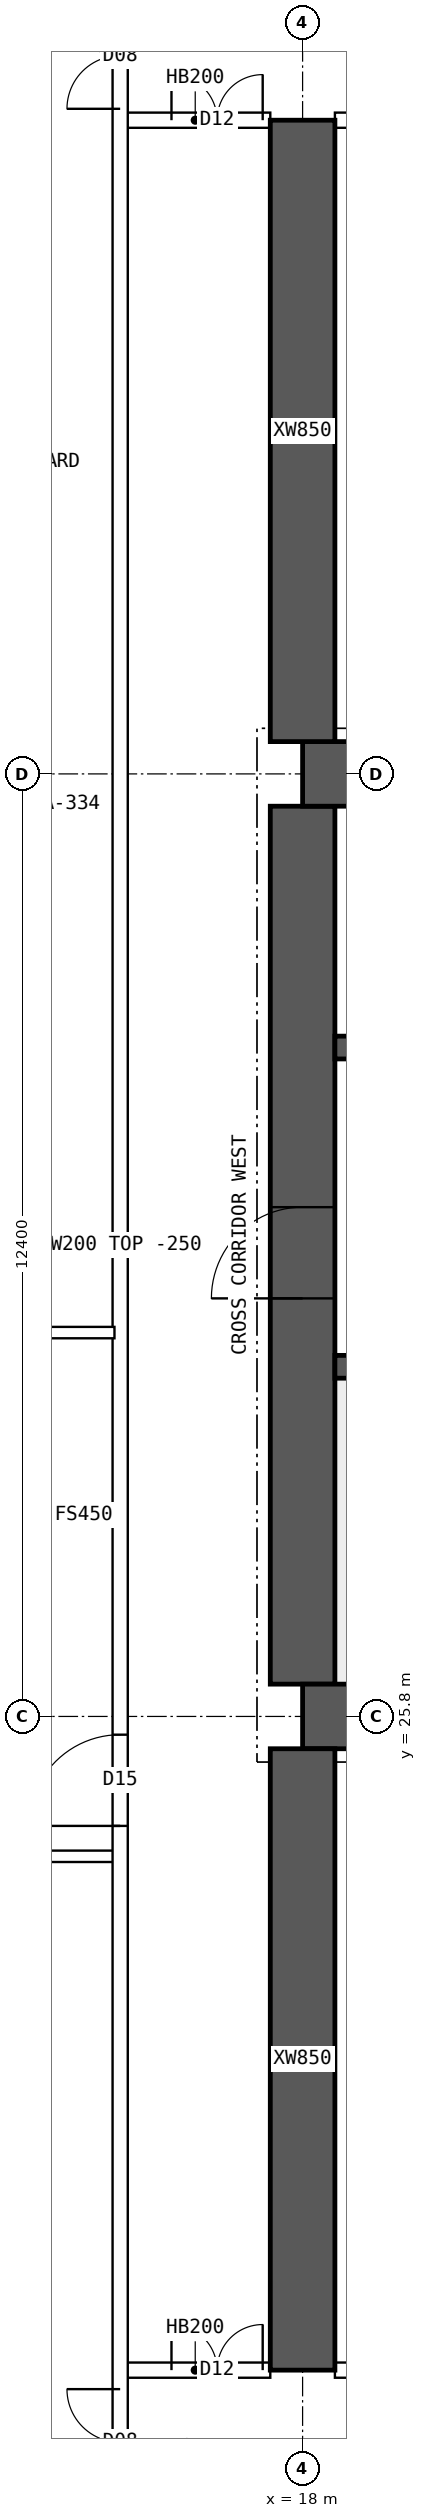
"""IFC4 building model, lengths in metres.
Left out: names, types, materials, properties, quantities, classifications, styles, units other than length and angle.
Written with IfcOpenShell. Run it as: python <this file> out.ifc"""

import sys

from ifc_helpers import new_model, si_unit, direction, frame, frame_2d, origin, place, context, subcontext, project, spatial, polyline, rectangle, outline, extrude, element, fill, save


model = new_model("IFC4")
c1 = context("Model", 3, precision=1e-05, world=origin(), true_north=direction((0.0, 1.0)))
c2 = subcontext(c1, "Body", "Model", "MODEL_VIEW")
j1 = project(units=[si_unit("LENGTHUNIT", "METRE"), si_unit("PLANEANGLEUNIT", "RADIAN")], contexts=[c1])
p1 = place(None, origin())
s1 = spatial("IfcSite", under=j1, at=p1, CompositionType="ELEMENT")
p2 = place(p1, origin())
s2 = spatial("IfcBuilding", under=s1, at=p2, CompositionType="ELEMENT")
p3 = place(p2, frame((0.0, 0.0, 163.6)))
s3 = spatial("IfcBuildingStorey", under=s2, at=p3, CompositionType="ELEMENT", Elevation=163.6)
for number, where, z_axis, x_axis in (
    (1, (18.0, 25.8, 0.0), (0.0, 0.0, 1.0), (1.0, 0.0, 0.0)),
    (2, (18.0, 38.2, 0.0), (0.0, 0.0, 1.0), (1.0, 0.0, 0.0)),
):
    element("IfcWall", number, at=place(p3, frame(where, z_axis=z_axis, x_axis=x_axis)), inside=s3, PredefinedType="SHEAR", context=c2, shape_type="SweptSolid", body=[
        extrude(rectangle(XDim=48.0, YDim=0.85, at=frame_2d((24.0, 0.0))), origin(), (0.0, 0.0, 1.0), 3.75),
    ])
p4 = place(p3, frame((18.0, 26.225, 0.0), z_axis=(0.0, 0.0, 1.0), x_axis=(0.0, 1.0, 0.0)))
e3 = element("IfcWall", 3, at=p4, inside=s3, PredefinedType="SHEAR", context=c2, shape_type="SweptSolid", body=[
    extrude(rectangle(XDim=11.55, YDim=0.85, at=frame_2d((5.775, 0.0))), origin(), (0.0, 0.0, 1.0), 3.75),
])
p5 = place(p4, frame((5.075, 0.0, 0.0)))
e4 = element("IfcOpeningElement", 4, at=p5, cuts=e3, PredefinedType="OPENING", context=c2, shape_type="SweptSolid", body=[
    extrude(rectangle(XDim=1.2, YDim=2.1, at=frame_2d((0.6, 1.05))), frame((0.0, 0.435, 0.0), z_axis=(0.0, -1.0, 0.0), x_axis=(1.0, 0.0, 0.0)), (0.0, 0.0, 1.0), 0.87),
])
p6 = place(p3, frame((18.425, 30.4, 0.0), z_axis=(0.0, 0.0, 1.0), x_axis=(1.0, 0.0, 0.0)))
e5 = element("IfcWall", 5, at=p6, inside=s3, PredefinedType="SHEAR", context=c2, shape_type="SweptSolid", body=[
    extrude(rectangle(XDim=47.15, YDim=0.3, at=frame_2d((23.575, 0.0))), origin(), (0.0, 0.0, 1.0), 3.75),
])
p7 = place(p6, frame((0.4, 0.0, 0.0)))
e6 = element("IfcOpeningElement", 6, at=p7, cuts=e5, PredefinedType="OPENING", context=c2, shape_type="SweptSolid", body=[
    extrude(rectangle(XDim=1.0, YDim=2.1, at=frame_2d((0.5, 1.05))), frame((0.0, 0.16, 0.0), z_axis=(0.0, -1.0, 0.0), x_axis=(1.0, 0.0, 0.0)), (0.0, 0.0, 1.0), 0.32),
])
p8 = place(p6, frame((45.75, 0.0, 0.0)))
e7 = element("IfcOpeningElement", 7, at=p8, cuts=e5, PredefinedType="OPENING", context=c2, shape_type="SweptSolid", body=[
    extrude(rectangle(XDim=1.0, YDim=2.1, at=frame_2d((0.5, 1.05))), frame((0.0, 0.16, 0.0), z_axis=(0.0, -1.0, 0.0), x_axis=(1.0, 0.0, 0.0)), (0.0, 0.0, 1.0), 0.32),
])
p9 = place(p6, frame((8.325, 0.0, 0.0)))
e8 = element("IfcOpeningElement", 8, at=p9, cuts=e5, PredefinedType="OPENING", context=c2, shape_type="SweptSolid", body=[
    extrude(rectangle(XDim=1.1, YDim=2.1, at=frame_2d((0.55, 1.05))), frame((0.0, 0.16, 0.0), z_axis=(0.0, -1.0, 0.0), x_axis=(1.0, 0.0, 0.0)), (0.0, 0.0, 1.0), 0.32),
])
p10 = place(p6, frame((10.925, 0.0, 0.0)))
e9 = element("IfcOpeningElement", 9, at=p10, cuts=e5, PredefinedType="OPENING", context=c2, shape_type="SweptSolid", body=[
    extrude(rectangle(XDim=1.1, YDim=2.1, at=frame_2d((0.55, 1.05))), frame((0.0, 0.16, 0.0), z_axis=(0.0, -1.0, 0.0), x_axis=(1.0, 0.0, 0.0)), (0.0, 0.0, 1.0), 0.32),
])
p11 = place(p6, frame((13.525, 0.0, 0.0)))
e10 = element("IfcOpeningElement", 10, at=p11, cuts=e5, PredefinedType="OPENING", context=c2, shape_type="SweptSolid", body=[
    extrude(rectangle(XDim=1.1, YDim=2.1, at=frame_2d((0.55, 1.05))), frame((0.0, 0.16, 0.0), z_axis=(0.0, -1.0, 0.0), x_axis=(1.0, 0.0, 0.0)), (0.0, 0.0, 1.0), 0.32),
])
p12 = place(p6, frame((16.125, 0.0, 0.0)))
e11 = element("IfcOpeningElement", 11, at=p12, cuts=e5, PredefinedType="OPENING", context=c2, shape_type="SweptSolid", body=[
    extrude(rectangle(XDim=1.1, YDim=2.1, at=frame_2d((0.55, 1.05))), frame((0.0, 0.16, 0.0), z_axis=(0.0, -1.0, 0.0), x_axis=(1.0, 0.0, 0.0)), (0.0, 0.0, 1.0), 0.32),
])
p13 = place(p6, frame((18.9, 0.0, 0.0)))
e12 = element("IfcOpeningElement", 12, at=p13, cuts=e5, PredefinedType="OPENING", context=c2, shape_type="SweptSolid", body=[
    extrude(rectangle(XDim=0.9, YDim=2.1, at=frame_2d((0.45, 1.05))), frame((0.0, 0.16, 0.0), z_axis=(0.0, -1.0, 0.0), x_axis=(1.0, 0.0, 0.0)), (0.0, 0.0, 1.0), 0.32),
])
p14 = place(p6, frame((30.192, 0.0, 0.0)))
e13 = element("IfcOpeningElement", 13, at=p14, cuts=e5, PredefinedType="OPENING", context=c2, shape_type="SweptSolid", body=[
    extrude(rectangle(XDim=1.1, YDim=2.1, at=frame_2d((0.55, 1.05))), frame((0.0, 0.16, 0.0), z_axis=(0.0, -1.0, 0.0), x_axis=(1.0, 0.0, 0.0)), (0.0, 0.0, 1.0), 0.32),
])
p15 = place(p6, frame((33.725, 0.0, 0.0)))
e14 = element("IfcOpeningElement", 14, at=p15, cuts=e5, PredefinedType="OPENING", context=c2, shape_type="SweptSolid", body=[
    extrude(rectangle(XDim=1.1, YDim=2.1, at=frame_2d((0.55, 1.05))), frame((0.0, 0.16, 0.0), z_axis=(0.0, -1.0, 0.0), x_axis=(1.0, 0.0, 0.0)), (0.0, 0.0, 1.0), 0.32),
])
p16 = place(p6, frame((37.258, 0.0, 0.0)))
e15 = element("IfcOpeningElement", 15, at=p16, cuts=e5, PredefinedType="OPENING", context=c2, shape_type="SweptSolid", body=[
    extrude(rectangle(XDim=1.1, YDim=2.1, at=frame_2d((0.55, 1.05))), frame((0.0, 0.16, 0.0), z_axis=(0.0, -1.0, 0.0), x_axis=(1.0, 0.0, 0.0)), (0.0, 0.0, 1.0), 0.32),
])
p17 = place(p3, frame((18.425, 34.6, 0.0), z_axis=(0.0, 0.0, 1.0), x_axis=(1.0, 0.0, 0.0)))
e16 = element("IfcWall", 16, at=p17, inside=s3, PredefinedType="SHEAR", context=c2, shape_type="SweptSolid", body=[
    extrude(rectangle(XDim=47.15, YDim=0.3, at=frame_2d((23.575, 0.0))), origin(), (0.0, 0.0, 1.0), 3.75),
])
p18 = place(p17, frame((0.9, 0.0, 0.0)))
e17 = element("IfcOpeningElement", 17, at=p18, cuts=e16, PredefinedType="OPENING", context=c2, shape_type="SweptSolid", body=[
    extrude(rectangle(XDim=1.1, YDim=2.1, at=frame_2d((0.55, 1.05))), frame((0.0, 0.16, 0.0), z_axis=(0.0, -1.0, 0.0), x_axis=(1.0, 0.0, 0.0)), (0.0, 0.0, 1.0), 0.32),
])
p19 = place(p17, frame((45.15, 0.0, 0.0)))
e18 = element("IfcOpeningElement", 18, at=p19, cuts=e16, PredefinedType="OPENING", context=c2, shape_type="SweptSolid", body=[
    extrude(rectangle(XDim=1.1, YDim=2.1, at=frame_2d((0.55, 1.05))), frame((0.0, 0.16, 0.0), z_axis=(0.0, -1.0, 0.0), x_axis=(1.0, 0.0, 0.0)), (0.0, 0.0, 1.0), 0.32),
])
p20 = place(p17, frame((4.175, 0.0, 0.0)))
e19 = element("IfcOpeningElement", 19, at=p20, cuts=e16, PredefinedType="OPENING", context=c2, shape_type="SweptSolid", body=[
    extrude(rectangle(XDim=0.9, YDim=2.1, at=frame_2d((0.45, 1.05))), frame((0.0, 0.16, 0.0), z_axis=(0.0, -1.0, 0.0), x_axis=(1.0, 0.0, 0.0)), (0.0, 0.0, 1.0), 0.32),
])
p21 = place(p17, frame((42.075, 0.0, 0.0)))
e20 = element("IfcOpeningElement", 20, at=p21, cuts=e16, PredefinedType="OPENING", context=c2, shape_type="SweptSolid", body=[
    extrude(rectangle(XDim=0.9, YDim=2.1, at=frame_2d((0.45, 1.05))), frame((0.0, 0.16, 0.0), z_axis=(0.0, -1.0, 0.0), x_axis=(1.0, 0.0, 0.0)), (0.0, 0.0, 1.0), 0.32),
])
p22 = place(p17, frame((8.95, 0.0, 0.0)))
e21 = element("IfcOpeningElement", 21, at=p22, cuts=e16, PredefinedType="OPENING", context=c2, shape_type="SweptSolid", body=[
    extrude(rectangle(XDim=0.9, YDim=2.1, at=frame_2d((0.45, 1.05))), frame((0.0, 0.16, 0.0), z_axis=(0.0, -1.0, 0.0), x_axis=(1.0, 0.0, 0.0)), (0.0, 0.0, 1.0), 0.32),
])
p23 = place(p17, frame((12.924, 0.0, 0.0)))
e22 = element("IfcOpeningElement", 22, at=p23, cuts=e16, PredefinedType="OPENING", context=c2, shape_type="SweptSolid", body=[
    extrude(rectangle(XDim=0.9, YDim=2.1, at=frame_2d((0.45, 1.05))), frame((0.0, 0.16, 0.0), z_axis=(0.0, -1.0, 0.0), x_axis=(1.0, 0.0, 0.0)), (0.0, 0.0, 1.0), 0.32),
])
p24 = place(p17, frame((16.571, 0.0, 0.0)))
e23 = element("IfcOpeningElement", 23, at=p24, cuts=e16, PredefinedType="OPENING", context=c2, shape_type="SweptSolid", body=[
    extrude(rectangle(XDim=0.9, YDim=2.1, at=frame_2d((0.45, 1.05))), frame((0.0, 0.16, 0.0), z_axis=(0.0, -1.0, 0.0), x_axis=(1.0, 0.0, 0.0)), (0.0, 0.0, 1.0), 0.32),
])
p25 = place(p17, frame((20.33, 0.0, 0.0)))
e24 = element("IfcOpeningElement", 24, at=p25, cuts=e16, PredefinedType="OPENING", context=c2, shape_type="SweptSolid", body=[
    extrude(rectangle(XDim=0.9, YDim=2.1, at=frame_2d((0.45, 1.05))), frame((0.0, 0.16, 0.0), z_axis=(0.0, -1.0, 0.0), x_axis=(1.0, 0.0, 0.0)), (0.0, 0.0, 1.0), 0.32),
])
p26 = place(p17, frame((24.736, 0.0, 0.0)))
e25 = element("IfcOpeningElement", 25, at=p26, cuts=e16, PredefinedType="OPENING", context=c2, shape_type="SweptSolid", body=[
    extrude(rectangle(XDim=0.9, YDim=2.1, at=frame_2d((0.45, 1.05))), frame((0.0, 0.16, 0.0), z_axis=(0.0, -1.0, 0.0), x_axis=(1.0, 0.0, 0.0)), (0.0, 0.0, 1.0), 0.32),
])
p27 = place(p17, frame((27.533, 0.0, 0.0)))
e26 = element("IfcOpeningElement", 26, at=p27, cuts=e16, PredefinedType="OPENING", context=c2, shape_type="SweptSolid", body=[
    extrude(rectangle(XDim=0.9, YDim=2.1, at=frame_2d((0.45, 1.05))), frame((0.0, 0.16, 0.0), z_axis=(0.0, -1.0, 0.0), x_axis=(1.0, 0.0, 0.0)), (0.0, 0.0, 1.0), 0.32),
])
p28 = place(p17, frame((29.906, 0.0, 0.0)))
e27 = element("IfcOpeningElement", 27, at=p28, cuts=e16, PredefinedType="OPENING", context=c2, shape_type="SweptSolid", body=[
    extrude(rectangle(XDim=0.9, YDim=2.1, at=frame_2d((0.45, 1.05))), frame((0.0, 0.16, 0.0), z_axis=(0.0, -1.0, 0.0), x_axis=(1.0, 0.0, 0.0)), (0.0, 0.0, 1.0), 0.32),
])
p29 = place(p17, frame((33.756, 0.0, 0.0)))
e28 = element("IfcOpeningElement", 28, at=p29, cuts=e16, PredefinedType="OPENING", context=c2, shape_type="SweptSolid", body=[
    extrude(rectangle(XDim=0.9, YDim=2.1, at=frame_2d((0.45, 1.05))), frame((0.0, 0.16, 0.0), z_axis=(0.0, -1.0, 0.0), x_axis=(1.0, 0.0, 0.0)), (0.0, 0.0, 1.0), 0.32),
])
p30 = place(p17, frame((37.504, 0.0, 0.0)))
e29 = element("IfcOpeningElement", 29, at=p30, cuts=e16, PredefinedType="OPENING", context=c2, shape_type="SweptSolid", body=[
    extrude(rectangle(XDim=0.9, YDim=2.1, at=frame_2d((0.45, 1.05))), frame((0.0, 0.16, 0.0), z_axis=(0.0, -1.0, 0.0), x_axis=(1.0, 0.0, 0.0)), (0.0, 0.0, 1.0), 0.32),
])
for number, where, z_axis, x_axis in (
    (30, (18.0, 17.2, 0.0), (0.0, 0.0, 1.0), (0.0, 1.0, 0.0)),
    (31, (18.0, 38.625, 0.0), (0.0, 0.0, 1.0), (0.0, 1.0, 0.0)),
):
    element("IfcWall", number, at=place(p3, frame(where, z_axis=z_axis, x_axis=x_axis)), inside=s3, PredefinedType="SHEAR", context=c2, shape_type="SweptSolid", body=[
        extrude(rectangle(XDim=8.175, YDim=0.85, at=frame_2d((4.087, 0.0))), origin(), (0.0, 0.0, 1.0), 3.75),
    ])
p31 = place(p3, frame((15.6, 17.2, 0.0), z_axis=(0.0, 0.0, 1.0), x_axis=(1.0, 0.0, 0.0)))
e32 = element("IfcWall", 32, at=p31, inside=s3, PredefinedType="SOLIDWALL", context=c2, shape_type="SweptSolid", body=[
    extrude(rectangle(XDim=1.975, YDim=0.2, at=frame_2d((0.987, 0.0))), origin(), (0.0, 0.0, 1.0), 3.5),
])
p32 = place(p31, frame((0.675, 0.0, 0.0)))
e33 = element("IfcOpeningElement", 33, at=p32, cuts=e32, PredefinedType="OPENING", context=c2, shape_type="SweptSolid", body=[
    extrude(rectangle(XDim=1.2, YDim=2.1, at=frame_2d((0.6, 1.05))), frame((0.0, 0.11, 0.0), z_axis=(0.0, -1.0, 0.0), x_axis=(1.0, 0.0, 0.0)), (0.0, 0.0, 1.0), 0.22),
])
p33 = place(p3, frame((18.425, 17.2, 0.0), z_axis=(0.0, 0.0, 1.0), x_axis=(1.0, 0.0, 0.0)))
e34 = element("IfcWall", 34, at=p33, inside=s3, PredefinedType="SOLIDWALL", context=c2, shape_type="SweptSolid", body=[
    extrude(rectangle(XDim=5.15, YDim=0.2, at=frame_2d((2.575, 0.0))), origin(), (0.0, 0.0, 1.0), 3.5),
])
p34 = place(p33, frame((0.8, 0.0, 0.0)))
e35 = element("IfcOpeningElement", 35, at=p34, cuts=e34, PredefinedType="OPENING", context=c2, shape_type="SweptSolid", body=[
    extrude(rectangle(XDim=1.0, YDim=2.1, at=frame_2d((0.5, 1.05))), frame((0.0, 0.11, 0.0), z_axis=(0.0, -1.0, 0.0), x_axis=(1.0, 0.0, 0.0)), (0.0, 0.0, 1.0), 0.22),
])
p35 = place(p3, frame((15.6, 46.8, 0.0), z_axis=(0.0, 0.0, 1.0), x_axis=(1.0, 0.0, 0.0)))
e36 = element("IfcWall", 36, at=p35, inside=s3, PredefinedType="SOLIDWALL", context=c2, shape_type="SweptSolid", body=[
    extrude(rectangle(XDim=1.975, YDim=0.2, at=frame_2d((0.987, 0.0))), origin(), (0.0, 0.0, 1.0), 3.5),
])
p36 = place(p35, frame((0.675, 0.0, 0.0)))
e37 = element("IfcOpeningElement", 37, at=p36, cuts=e36, PredefinedType="OPENING", context=c2, shape_type="SweptSolid", body=[
    extrude(rectangle(XDim=1.2, YDim=2.1, at=frame_2d((0.6, 1.05))), frame((0.0, 0.11, 0.0), z_axis=(0.0, -1.0, 0.0), x_axis=(1.0, 0.0, 0.0)), (0.0, 0.0, 1.0), 0.22),
])
p37 = place(p3, frame((18.425, 46.8, 0.0), z_axis=(0.0, 0.0, 1.0), x_axis=(1.0, 0.0, 0.0)))
e38 = element("IfcWall", 38, at=p37, inside=s3, PredefinedType="SOLIDWALL", context=c2, shape_type="SweptSolid", body=[
    extrude(rectangle(XDim=5.15, YDim=0.2, at=frame_2d((2.575, 0.0))), origin(), (0.0, 0.0, 1.0), 3.5),
])
p38 = place(p37, frame((0.35, 0.0, 0.0)))
e39 = element("IfcOpeningElement", 39, at=p38, cuts=e38, PredefinedType="OPENING", context=c2, shape_type="SweptSolid", body=[
    extrude(rectangle(XDim=0.9, YDim=2.1, at=frame_2d((0.45, 1.05))), frame((0.0, 0.11, 0.0), z_axis=(0.0, -1.0, 0.0), x_axis=(1.0, 0.0, 0.0)), (0.0, 0.0, 1.0), 0.22),
])
p39 = place(p37, frame((2.725, 0.0, 0.0)))
e40 = element("IfcOpeningElement", 40, at=p39, cuts=e38, PredefinedType="OPENING", context=c2, shape_type="SweptSolid", body=[
    extrude(rectangle(XDim=0.9, YDim=2.1, at=frame_2d((0.45, 1.05))), frame((0.0, 0.11, 0.0), z_axis=(0.0, -1.0, 0.0), x_axis=(1.0, 0.0, 0.0)), (0.0, 0.0, 1.0), 0.22),
])
p40 = place(p3, frame((8.705, 30.85, 0.0), z_axis=(0.0, 0.0, 1.0), x_axis=(1.0, 0.0, 0.0)))
e41 = element("IfcWall", 41, at=p40, inside=s3, PredefinedType="PARTITIONING", context=c2, shape_type="SweptSolid", body=[
    extrude(outline(polyline([(0.0, 0.0), (6.82, 0.0), (6.82, 3.5), (3.597, 3.5), (3.595, 3.05), (2.997, 3.05), (2.995, 3.5), (0.0, 3.5), (0.0, 0.0)])), frame((0.0, 0.075, 0.0), z_axis=(0.0, -1.0, 0.0), x_axis=(1.0, 0.0, 0.0)), (0.0, 0.0, 1.0), 0.15),
])
p41 = place(p3, frame((15.6, 10.446, 0.0), z_axis=(0.0, 0.0, 1.0), x_axis=(0.0, 1.0, 0.0)))
e42 = element("IfcWall", 42, at=p41, inside=s3, PredefinedType="SOLIDWALL", context=c2, shape_type="SweptSolid", body=[
    extrude(rectangle(XDim=43.107, YDim=0.2, at=frame_2d((21.554, 0.0))), origin(), (0.0, 0.0, 1.0), 3.5),
])
p42 = place(p41, frame((13.914, 0.0, 0.0)))
e43 = element("IfcOpeningElement", 43, at=p42, cuts=e42, PredefinedType="OPENING", context=c2, shape_type="SweptSolid", body=[
    extrude(rectangle(XDim=1.2, YDim=2.1, at=frame_2d((0.6, 1.05))), frame((0.0, 0.11, 0.0), z_axis=(0.0, -1.0, 0.0), x_axis=(1.0, 0.0, 0.0)), (0.0, 0.0, 1.0), 0.22),
])
p43 = place(p41, frame((5.104, 0.0, 0.0)))
e44 = element("IfcOpeningElement", 44, at=p43, cuts=e42, PredefinedType="OPENING", context=c2, shape_type="SweptSolid", body=[
    extrude(rectangle(XDim=1.4, YDim=2.1, at=frame_2d((0.7, 1.05))), frame((0.0, 0.11, 0.0), z_axis=(0.0, -1.0, 0.0), x_axis=(1.0, 0.0, 0.0)), (0.0, 0.0, 1.0), 0.22),
])
p44 = place(p41, frame((36.504, 0.0, 0.0)))
e45 = element("IfcOpeningElement", 45, at=p44, cuts=e42, PredefinedType="OPENING", context=c2, shape_type="SweptSolid", body=[
    extrude(rectangle(XDim=1.4, YDim=2.1, at=frame_2d((0.7, 1.05))), frame((0.0, 0.11, 0.0), z_axis=(0.0, -1.0, 0.0), x_axis=(1.0, 0.0, 0.0)), (0.0, 0.0, 1.0), 0.22),
])
p45 = place(p3, frame((8.705, 23.96, 0.0), z_axis=(0.0, 0.0, 1.0), x_axis=(1.0, 0.0, 0.0)))
e46 = element("IfcWall", 46, at=p45, inside=s3, PredefinedType="PARTITIONING", context=c2, shape_type="SweptSolid", body=[
    extrude(rectangle(XDim=6.82, YDim=0.15, at=frame_2d((3.41, 0.0))), origin(), (0.0, 0.0, 1.0), 3.5),
])
p46 = place(p5, origin())
e47 = element("IfcDoor", 47, at=p46, inside=s3, OperationType="SINGLE_SWING_LEFT", PredefinedType="DOOR", context=c2, shape_type="SweptSolid", body=[
    extrude(rectangle(XDim=1.2, YDim=2.1, at=frame_2d((0.6, 1.05))), frame((0.0, 0.025, 0.0), z_axis=(0.0, -1.0, 0.0), x_axis=(1.0, 0.0, 0.0)), (0.0, 0.0, 1.0), 0.05),
])
fill(e4, e47)
p47 = place(p32, origin())
e48 = element("IfcDoor", 48, at=p47, inside=s3, OperationType="DOUBLE_DOOR_SINGLE_SWING", PredefinedType="DOOR", context=c2, shape_type="SweptSolid", body=[
    extrude(rectangle(XDim=1.2, YDim=2.1, at=frame_2d((0.6, 1.05))), frame((0.0, 0.025, 0.0), z_axis=(0.0, -1.0, 0.0), x_axis=(1.0, 0.0, 0.0)), (0.0, 0.0, 1.0), 0.05),
])
fill(e33, e48)
p48 = place(p36, origin())
e49 = element("IfcDoor", 49, at=p48, inside=s3, OperationType="DOUBLE_DOOR_SINGLE_SWING", PredefinedType="DOOR", context=c2, shape_type="SweptSolid", body=[
    extrude(rectangle(XDim=1.2, YDim=2.1, at=frame_2d((0.6, 1.05))), frame((0.0, 0.025, 0.0), z_axis=(0.0, -1.0, 0.0), x_axis=(1.0, 0.0, 0.0)), (0.0, 0.0, 1.0), 0.05),
])
fill(e37, e49)
p49 = place(p42, origin())
e50 = element("IfcDoor", 50, at=p49, inside=s3, OperationType="SINGLE_SWING_LEFT", PredefinedType="DOOR", context=c2, shape_type="SweptSolid", body=[
    extrude(rectangle(XDim=1.2, YDim=2.1, at=frame_2d((0.6, 1.05))), frame((0.0, 0.025, 0.0), z_axis=(0.0, -1.0, 0.0), x_axis=(1.0, 0.0, 0.0)), (0.0, 0.0, 1.0), 0.05),
])
fill(e43, e50)
p50 = place(p43, origin())
e51 = element("IfcDoor", 51, at=p50, inside=s3, OperationType="DOUBLE_DOOR_SINGLE_SWING", PredefinedType="DOOR", context=c2, shape_type="SweptSolid", body=[
    extrude(rectangle(XDim=1.4, YDim=2.1, at=frame_2d((0.7, 1.05))), frame((0.0, 0.025, 0.0), z_axis=(0.0, -1.0, 0.0), x_axis=(1.0, 0.0, 0.0)), (0.0, 0.0, 1.0), 0.05),
])
fill(e44, e51)
p51 = place(p44, origin())
e52 = element("IfcDoor", 52, at=p51, inside=s3, OperationType="DOUBLE_DOOR_SINGLE_SWING", PredefinedType="DOOR", context=c2, shape_type="SweptSolid", body=[
    extrude(rectangle(XDim=1.4, YDim=2.1, at=frame_2d((0.7, 1.05))), frame((0.0, 0.025, 0.0), z_axis=(0.0, -1.0, 0.0), x_axis=(1.0, 0.0, 0.0)), (0.0, 0.0, 1.0), 0.05),
])
fill(e45, e52)
save(model, sys.argv[1])
